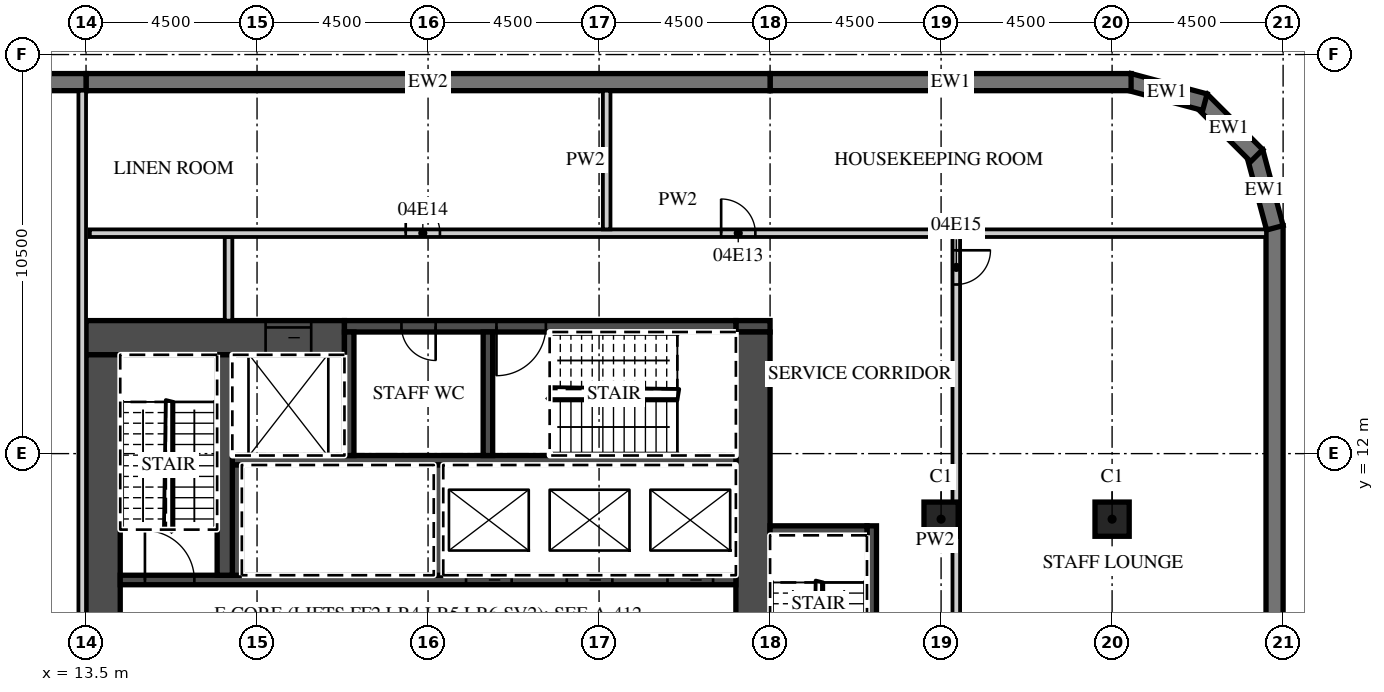
"""IFC4 building model, lengths in metres.
Left out: names, types, materials, properties, quantities, classifications, styles, units other than length and angle.
Written with IfcOpenShell. Run it as: python <this file> out.ifc"""

import sys

from ifc_helpers import new_model, si_unit, direction, frame, frame_2d, origin, origin_2d, place, context, subcontext, project, spatial, polyline, rectangle, outline, extrude, element, fill, save


model = new_model("IFC4")
c1 = context("Model", 3, precision=1e-05, world=origin(), true_north=direction((0.0, 1.0)))
c2 = subcontext(c1, "Body", "Model", "MODEL_VIEW")
j1 = project(units=[si_unit("LENGTHUNIT", "METRE"), si_unit("PLANEANGLEUNIT", "RADIAN")], contexts=[c1])
p1 = place(None, origin())
s1 = spatial("IfcSite", under=j1, at=p1, CompositionType="ELEMENT")
p2 = place(p1, origin())
s2 = spatial("IfcBuilding", under=s1, at=p2, CompositionType="ELEMENT")
p3 = place(p2, frame((0.0, 0.0, 29.0)))
s3 = spatial("IfcBuildingStorey", under=s2, at=p3, CompositionType="ELEMENT", Elevation=29.0)
for number, where, z_axis, x_axis in (
    (1, (36.0, 10.275, 0.0), (0.0, 0.0, 1.0), (1.0, 0.0, 0.0)),
    (2, (40.5, 10.275, 0.0), (0.0, 0.0, 1.0), (1.0, 0.0, 0.0)),
):
    element("IfcColumn", number, at=place(p3, frame(where, z_axis=z_axis, x_axis=x_axis)), inside=s3, PredefinedType="COLUMN", context=c2, shape_type="SweptSolid", body=[
        extrude(rectangle(XDim=0.9, YDim=0.9, at=origin_2d()), origin(), (0.0, 0.0, 1.0), 4.5),
    ])
p4 = place(p3, frame((44.775, -18.0, 0.0), z_axis=(0.0, 0.0, 1.0), x_axis=(0.0, 1.0, 0.0)))
e3 = element("IfcWall", 3, at=p4, inside=s3, PredefinedType="SOLIDWALL", context=c2, shape_type="SweptSolid", body=[
    extrude(rectangle(XDim=36.0, YDim=0.45, at=frame_2d((18.0, 0.0))), origin(), (0.0, 0.0, 1.0), 4.05),
])
p5 = place(p4, frame((4.05, 0.0, 0.9)))
e4 = element("IfcOpeningElement", 4, at=p5, cuts=e3, PredefinedType="OPENING", context=c2, shape_type="SweptSolid", body=[
    extrude(rectangle(XDim=3.0, YDim=1.8, at=frame_2d((1.5, 0.9))), frame((0.0, 0.235, 0.0), z_axis=(0.0, -1.0, 0.0), x_axis=(1.0, 0.0, 0.0)), (0.0, 0.0, 1.0), 0.47),
])
p6 = place(p3, frame((44.783, 17.942, 0.0), z_axis=(0.0, 0.0, 1.0), x_axis=(-0.25881466832, 0.965926999034, 0.0)))
e5 = element("IfcWall", 5, at=p6, inside=s3, PredefinedType="SOLIDWALL", context=c2, shape_type="SweptSolid", body=[
    extrude(outline(polyline([(0.0, -0.225), (2.071, -0.225), (1.95, 0.225), (0.121, 0.225), (0.0, -0.225)])), origin(), (0.0, 0.0, 1.0), 4.05),
])
p7 = place(p3, frame((44.305, 19.841, 0.0), z_axis=(0.0, 0.0, 1.0), x_axis=(-0.707106781187, 0.707106781187, 0.0)))
e6 = element("IfcWall", 6, at=p7, inside=s3, PredefinedType="SOLIDWALL", context=c2, shape_type="SweptSolid", body=[
    extrude(outline(polyline([(0.0, -0.225), (2.071, -0.225), (1.95, 0.225), (0.121, 0.225), (0.0, -0.225)])), origin(), (0.0, 0.0, 1.0), 4.05),
])
p8 = place(p3, frame((42.942, 21.247, 0.0), z_axis=(0.0, 0.0, 1.0), x_axis=(-0.965926999034, 0.25881466832, 0.0)))
e7 = element("IfcWall", 7, at=p8, inside=s3, PredefinedType="SOLIDWALL", context=c2, shape_type="SweptSolid", body=[
    extrude(outline(polyline([(-0.0, -0.225), (2.07, -0.225), (1.95, 0.225), (0.12, 0.225), (-0.0, -0.225)])), origin(), (0.0, 0.0, 1.0), 4.05),
])
p9 = place(p3, frame((41.0, 21.775, 0.0), z_axis=(0.0, 0.0, 1.0), x_axis=(-1.0, 0.0, 0.0)))
e8 = element("IfcWall", 8, at=p9, inside=s3, PredefinedType="SOLIDWALL", context=c2, shape_type="SweptSolid", body=[
    extrude(rectangle(XDim=9.5, YDim=0.45, at=frame_2d((4.75, 0.0))), origin(), (0.0, 0.0, 1.0), 4.05),
])
p10 = place(p3, frame((31.5, 21.775, 0.0), z_axis=(0.0, 0.0, 1.0), x_axis=(-1.0, 0.0, 0.0)))
e9 = element("IfcWall", 9, at=p10, inside=s3, PredefinedType="SOLIDWALL", context=c2, shape_type="SweptSolid", body=[
    extrude(rectangle(XDim=18.0, YDim=0.45, at=frame_2d((9.0, 0.0))), origin(), (0.0, 0.0, 1.0), 4.05),
])
p11 = place(p3, frame((13.5, 21.775, 0.0), z_axis=(0.0, 0.0, 1.0), x_axis=(-1.0, 0.0, 0.0)))
e10 = element("IfcWall", 10, at=p11, inside=s3, PredefinedType="SOLIDWALL", context=c2, shape_type="SweptSolid", body=[
    extrude(rectangle(XDim=54.5, YDim=0.45, at=frame_2d((27.25, 0.0))), origin(), (0.0, 0.0, 1.0), 4.05),
])
p12 = place(p11, frame((1.05, 0.0, 0.9)))
e11 = element("IfcOpeningElement", 11, at=p12, cuts=e10, PredefinedType="OPENING", context=c2, shape_type="SweptSolid", body=[
    extrude(rectangle(XDim=2.4, YDim=1.8, at=frame_2d((1.2, 0.9))), frame((0.0, 0.235, 0.0), z_axis=(0.0, -1.0, 0.0), x_axis=(1.0, 0.0, 0.0)), (0.0, 0.0, 1.0), 0.47),
])
p13 = place(p11, frame((5.55, 0.0, 0.9)))
e12 = element("IfcOpeningElement", 12, at=p13, cuts=e10, PredefinedType="OPENING", context=c2, shape_type="SweptSolid", body=[
    extrude(rectangle(XDim=2.4, YDim=1.8, at=frame_2d((1.2, 0.9))), frame((0.0, 0.235, 0.0), z_axis=(0.0, -1.0, 0.0), x_axis=(1.0, 0.0, 0.0)), (0.0, 0.0, 1.0), 0.47),
])
p14 = place(p11, frame((10.05, 0.0, 0.9)))
e13 = element("IfcOpeningElement", 13, at=p14, cuts=e10, PredefinedType="OPENING", context=c2, shape_type="SweptSolid", body=[
    extrude(rectangle(XDim=2.4, YDim=1.8, at=frame_2d((1.2, 0.9))), frame((0.0, 0.235, 0.0), z_axis=(0.0, -1.0, 0.0), x_axis=(1.0, 0.0, 0.0)), (0.0, 0.0, 1.0), 0.47),
])
p15 = place(p11, frame((14.55, 0.0, 0.9)))
e14 = element("IfcOpeningElement", 14, at=p15, cuts=e10, PredefinedType="OPENING", context=c2, shape_type="SweptSolid", body=[
    extrude(rectangle(XDim=2.4, YDim=1.8, at=frame_2d((1.2, 0.9))), frame((0.0, 0.235, 0.0), z_axis=(0.0, -1.0, 0.0), x_axis=(1.0, 0.0, 0.0)), (0.0, 0.0, 1.0), 0.47),
])
p16 = place(p11, frame((19.05, 0.0, 0.9)))
e15 = element("IfcOpeningElement", 15, at=p16, cuts=e10, PredefinedType="OPENING", context=c2, shape_type="SweptSolid", body=[
    extrude(rectangle(XDim=2.4, YDim=1.8, at=frame_2d((1.2, 0.9))), frame((0.0, 0.235, 0.0), z_axis=(0.0, -1.0, 0.0), x_axis=(1.0, 0.0, 0.0)), (0.0, 0.0, 1.0), 0.47),
])
p17 = place(p11, frame((23.55, 0.0, 0.9)))
e16 = element("IfcOpeningElement", 16, at=p17, cuts=e10, PredefinedType="OPENING", context=c2, shape_type="SweptSolid", body=[
    extrude(rectangle(XDim=2.4, YDim=1.8, at=frame_2d((1.2, 0.9))), frame((0.0, 0.235, 0.0), z_axis=(0.0, -1.0, 0.0), x_axis=(1.0, 0.0, 0.0)), (0.0, 0.0, 1.0), 0.47),
])
p18 = place(p11, frame((28.05, 0.0, 0.9)))
e17 = element("IfcOpeningElement", 17, at=p18, cuts=e10, PredefinedType="OPENING", context=c2, shape_type="SweptSolid", body=[
    extrude(rectangle(XDim=2.4, YDim=1.8, at=frame_2d((1.2, 0.9))), frame((0.0, 0.235, 0.0), z_axis=(0.0, -1.0, 0.0), x_axis=(1.0, 0.0, 0.0)), (0.0, 0.0, 1.0), 0.47),
])
p19 = place(p11, frame((32.55, 0.0, 0.9)))
e18 = element("IfcOpeningElement", 18, at=p19, cuts=e10, PredefinedType="OPENING", context=c2, shape_type="SweptSolid", body=[
    extrude(rectangle(XDim=2.4, YDim=1.8, at=frame_2d((1.2, 0.9))), frame((0.0, 0.235, 0.0), z_axis=(0.0, -1.0, 0.0), x_axis=(1.0, 0.0, 0.0)), (0.0, 0.0, 1.0), 0.47),
])
p20 = place(p11, frame((37.05, 0.0, 0.9)))
e19 = element("IfcOpeningElement", 19, at=p20, cuts=e10, PredefinedType="OPENING", context=c2, shape_type="SweptSolid", body=[
    extrude(rectangle(XDim=2.4, YDim=1.8, at=frame_2d((1.2, 0.9))), frame((0.0, 0.235, 0.0), z_axis=(0.0, -1.0, 0.0), x_axis=(1.0, 0.0, 0.0)), (0.0, 0.0, 1.0), 0.47),
])
p21 = place(p11, frame((41.55, 0.0, 0.9)))
e20 = element("IfcOpeningElement", 20, at=p21, cuts=e10, PredefinedType="OPENING", context=c2, shape_type="SweptSolid", body=[
    extrude(rectangle(XDim=2.4, YDim=1.8, at=frame_2d((1.2, 0.9))), frame((0.0, 0.235, 0.0), z_axis=(0.0, -1.0, 0.0), x_axis=(1.0, 0.0, 0.0)), (0.0, 0.0, 1.0), 0.47),
])
p22 = place(p11, frame((46.05, 0.0, 0.9)))
e21 = element("IfcOpeningElement", 21, at=p22, cuts=e10, PredefinedType="OPENING", context=c2, shape_type="SweptSolid", body=[
    extrude(rectangle(XDim=2.4, YDim=1.8, at=frame_2d((1.2, 0.9))), frame((0.0, 0.235, 0.0), z_axis=(0.0, -1.0, 0.0), x_axis=(1.0, 0.0, 0.0)), (0.0, 0.0, 1.0), 0.47),
])
p23 = place(p3, frame((13.5, 15.05, 0.0), z_axis=(0.0, 0.0, 1.0), x_axis=(1.0, 0.0, 0.0)))
e22 = element("IfcWall", 22, at=p23, inside=s3, PredefinedType="SHEAR", context=c2, shape_type="SweptSolid", body=[
    extrude(rectangle(XDim=6.8, YDim=0.9, at=frame_2d((3.4, 0.0))), origin(), (0.0, 0.0, 1.0), 4.05),
])
p24 = place(p23, frame((4.725, 0.0, 0.0)))
e23 = element("IfcOpeningElement", 23, at=p24, cuts=e22, PredefinedType="OPENING", context=c2, shape_type="SweptSolid", body=[
    extrude(rectangle(XDim=1.2, YDim=2.1, at=frame_2d((0.6, 1.05))), frame((0.0, 0.46, 0.0), z_axis=(0.0, -1.0, 0.0), x_axis=(1.0, 0.0, 0.0)), (0.0, 0.0, 1.0), 0.92),
])
p25 = place(p3, frame((30.6, 15.35, 0.0), z_axis=(0.0, 0.0, 1.0), x_axis=(1.0, 0.0, 0.0)))
e24 = element("IfcWall", 24, at=p25, inside=s3, PredefinedType="SHEAR", context=c2, shape_type="SweptSolid", body=[
    extrude(rectangle(XDim=0.9, YDim=0.3, at=frame_2d((0.45, 0.0))), origin(), (0.0, 0.0, 1.0), 4.05),
])
p26 = place(p3, frame((20.3, 15.35, 0.0), z_axis=(0.0, 0.0, 1.0), x_axis=(1.0, 0.0, 0.0)))
e25 = element("IfcWall", 25, at=p26, inside=s3, PredefinedType="SHEAR", context=c2, shape_type="SweptSolid", body=[
    extrude(rectangle(XDim=10.3, YDim=0.3, at=frame_2d((5.15, 0.0))), origin(), (0.0, 0.0, 1.0), 4.05),
])
p27 = place(p26, frame((4.0, 0.0, 0.0)))
e26 = element("IfcOpeningElement", 26, at=p27, cuts=e25, PredefinedType="OPENING", context=c2, shape_type="SweptSolid", body=[
    extrude(rectangle(XDim=1.3, YDim=2.1, at=frame_2d((0.65, 1.05))), frame((0.0, 0.16, 0.0), z_axis=(0.0, -1.0, 0.0), x_axis=(1.0, 0.0, 0.0)), (0.0, 0.0, 1.0), 0.32),
])
p28 = place(p26, frame((1.5, 0.0, 0.0)))
e27 = element("IfcOpeningElement", 27, at=p28, cuts=e25, PredefinedType="OPENING", context=c2, shape_type="SweptSolid", body=[
    extrude(rectangle(XDim=0.9, YDim=2.1, at=frame_2d((0.45, 1.05))), frame((0.0, 0.16, 0.0), z_axis=(0.0, -1.0, 0.0), x_axis=(1.0, 0.0, 0.0)), (0.0, 0.0, 1.0), 0.32),
])
p29 = place(p3, frame((31.05, 2.4, 0.0), z_axis=(0.0, 0.0, 1.0), x_axis=(0.0, 1.0, 0.0)))
e28 = element("IfcWall", 28, at=p29, inside=s3, PredefinedType="SHEAR", context=c2, shape_type="SweptSolid", body=[
    extrude(rectangle(XDim=12.8, YDim=0.9, at=frame_2d((6.4, 0.0))), origin(), (0.0, 0.0, 1.0), 4.05),
])
p30 = place(p29, frame((0.2, 0.0, 0.0)))
e29 = element("IfcOpeningElement", 29, at=p30, cuts=e28, PredefinedType="OPENING", context=c2, shape_type="SweptSolid", body=[
    extrude(rectangle(XDim=1.1, YDim=2.1, at=frame_2d((0.55, 1.05))), frame((0.0, 0.46, 0.0), z_axis=(0.0, -1.0, 0.0), x_axis=(1.0, 0.0, 0.0)), (0.0, 0.0, 1.0), 0.92),
])
p31 = place(p3, frame((13.95, 2.4, 0.0), z_axis=(0.0, 0.0, 1.0), x_axis=(0.0, 1.0, 0.0)))
e30 = element("IfcWall", 30, at=p31, inside=s3, PredefinedType="SHEAR", context=c2, shape_type="SweptSolid", body=[
    extrude(rectangle(XDim=12.2, YDim=0.9, at=frame_2d((6.1, 0.0))), origin(), (0.0, 0.0, 1.0), 4.05),
])
p32 = place(p3, frame((14.4, 8.675, 0.0), z_axis=(0.0, 0.0, 1.0), x_axis=(1.0, 0.0, 0.0)))
e31 = element("IfcWall", 31, at=p32, inside=s3, PredefinedType="SHEAR", context=c2, shape_type="SweptSolid", body=[
    extrude(rectangle(XDim=16.2, YDim=0.25, at=frame_2d((8.1, 0.0))), origin(), (0.0, 0.0, 1.0), 4.05),
])
p33 = place(p32, frame((14.4, 0.0, 0.0)))
e32 = element("IfcOpeningElement", 32, at=p33, cuts=e31, PredefinedType="OPENING", context=c2, shape_type="SweptSolid", body=[
    extrude(rectangle(XDim=1.2, YDim=2.1, at=frame_2d((0.6, 1.05))), frame((0.0, 0.135, 0.0), z_axis=(0.0, -1.0, 0.0), x_axis=(1.0, 0.0, 0.0)), (0.0, 0.0, 1.0), 0.27),
])
p34 = place(p32, frame((11.75, 0.0, 0.0)))
e33 = element("IfcOpeningElement", 33, at=p34, cuts=e31, PredefinedType="OPENING", context=c2, shape_type="SweptSolid", body=[
    extrude(rectangle(XDim=1.2, YDim=2.1, at=frame_2d((0.6, 1.05))), frame((0.0, 0.135, 0.0), z_axis=(0.0, -1.0, 0.0), x_axis=(1.0, 0.0, 0.0)), (0.0, 0.0, 1.0), 0.27),
])
p35 = place(p32, frame((9.1, 0.0, 0.0)))
e34 = element("IfcOpeningElement", 34, at=p35, cuts=e31, PredefinedType="OPENING", context=c2, shape_type="SweptSolid", body=[
    extrude(rectangle(XDim=1.2, YDim=2.1, at=frame_2d((0.6, 1.05))), frame((0.0, 0.135, 0.0), z_axis=(0.0, -1.0, 0.0), x_axis=(1.0, 0.0, 0.0)), (0.0, 0.0, 1.0), 0.27),
])
p36 = place(p32, frame((0.65, 0.0, 0.0)))
e35 = element("IfcOpeningElement", 35, at=p36, cuts=e31, PredefinedType="OPENING", context=c2, shape_type="SweptSolid", body=[
    extrude(rectangle(XDim=1.3, YDim=2.1, at=frame_2d((0.65, 1.05))), frame((0.0, 0.135, 0.0), z_axis=(0.0, -1.0, 0.0), x_axis=(1.0, 0.0, 0.0)), (0.0, 0.0, 1.0), 0.27),
])
p37 = place(p3, frame((17.35, 11.825, 0.0), z_axis=(0.0, 0.0, 1.0), x_axis=(1.0, 0.0, 0.0)))
e36 = element("IfcWall", 36, at=p37, inside=s3, PredefinedType="SHEAR", context=c2, shape_type="SweptSolid", body=[
    extrude(rectangle(XDim=13.25, YDim=0.25, at=frame_2d((6.625, 0.0))), origin(), (0.0, 0.0, 1.0), 4.05),
])
for number, where, z_axis, x_axis in (
    (37, (17.475, 8.8, 0.0), (0.0, 0.0, 1.0), (0.0, 1.0, 0.0)),
    (38, (22.775, 8.8, 0.0), (0.0, 0.0, 1.0), (0.0, 1.0, 0.0)),
):
    element("IfcWall", number, at=place(p3, frame(where, z_axis=z_axis, x_axis=x_axis)), inside=s3, PredefinedType="SHEAR", context=c2, shape_type="SweptSolid", body=[
        extrude(rectangle(XDim=2.9, YDim=0.25, at=frame_2d((1.45, 0.0))), origin(), (0.0, 0.0, 1.0), 4.05),
    ])
p38 = place(p3, frame((17.15, 8.8, 0.0), z_axis=(0.0, 0.0, 1.0), x_axis=(0.0, 1.0, 0.0)))
e39 = element("IfcWall", 39, at=p38, inside=s3, PredefinedType="SHEAR", context=c2, shape_type="SweptSolid", body=[
    extrude(rectangle(XDim=5.8, YDim=0.4, at=frame_2d((2.9, 0.0))), origin(), (0.0, 0.0, 1.0), 4.05),
])
for number, where, z_axis, x_axis in (
    (40, (20.425, 11.95, 0.0), (0.0, 0.0, 1.0), (0.0, 1.0, 0.0)),
    (41, (24.075, 11.95, 0.0), (0.0, 0.0, 1.0), (0.0, 1.0, 0.0)),
):
    element("IfcWall", number, at=place(p3, frame(where, z_axis=z_axis, x_axis=x_axis)), inside=s3, PredefinedType="SHEAR", context=c2, shape_type="SweptSolid", body=[
        extrude(rectangle(XDim=3.25, YDim=0.25, at=frame_2d((1.625, 0.0))), origin(), (0.0, 0.0, 1.0), 4.05),
    ])
p39 = place(p3, frame((34.175, 1.75, 0.0), z_axis=(0.0, 0.0, 1.0), x_axis=(0.0, 1.0, 0.0)))
e42 = element("IfcWall", 42, at=p39, inside=s3, PredefinedType="SHEAR", context=c2, shape_type="SweptSolid", body=[
    extrude(rectangle(XDim=8.35, YDim=0.25, at=frame_2d((4.175, 0.0))), origin(), (0.0, 0.0, 1.0), 4.05),
])
p40 = place(p3, frame((31.5, 9.975, 0.0), z_axis=(0.0, 0.0, 1.0), x_axis=(1.0, 0.0, 0.0)))
e43 = element("IfcWall", 43, at=p40, inside=s3, PredefinedType="SHEAR", context=c2, shape_type="SweptSolid", body=[
    extrude(rectangle(XDim=2.55, YDim=0.25, at=frame_2d((1.275, 0.0))), origin(), (0.0, 0.0, 1.0), 4.05),
])
p41 = place(p3, frame((17.25, 15.5, 0.0), z_axis=(0.0, 0.0, 1.0), x_axis=(0.0, 1.0, 0.0)))
e44 = element("IfcWall", 44, at=p41, inside=s3, PredefinedType="PARTITIONING", context=c2, shape_type="SweptSolid", body=[
    extrude(rectangle(XDim=2.2, YDim=0.2, at=frame_2d((1.1, 0.0))), origin(), (0.0, 0.0, 1.0), 4.05),
])
p42 = place(p3, frame((36.4, 1.75, 0.0), z_axis=(0.0, 0.0, 1.0), x_axis=(0.0, 1.0, 0.0)))
e45 = element("IfcWall", 45, at=p42, inside=s3, PredefinedType="PARTITIONING", context=c2, shape_type="SweptSolid", body=[
    extrude(rectangle(XDim=15.95, YDim=0.2, at=frame_2d((7.975, 0.0))), origin(), (0.0, 0.0, 1.0), 4.05),
])
p43 = place(p42, frame((14.7, 0.0, 0.0)))
e46 = element("IfcOpeningElement", 46, at=p43, cuts=e45, PredefinedType="OPENING", context=c2, shape_type="SweptSolid", body=[
    extrude(rectangle(XDim=0.9, YDim=2.1, at=frame_2d((0.45, 1.05))), frame((0.0, 0.11, 0.0), z_axis=(0.0, -1.0, 0.0), x_axis=(1.0, 0.0, 0.0)), (0.0, 0.0, 1.0), 0.22),
])
p44 = place(p3, frame((13.6, 17.8, 0.0), z_axis=(0.0, 0.0, 1.0), x_axis=(1.0, 0.0, 0.0)))
e47 = element("IfcWall", 47, at=p44, inside=s3, PredefinedType="PARTITIONING", context=c2, shape_type="SweptSolid", body=[
    extrude(rectangle(XDim=30.95, YDim=0.2, at=frame_2d((15.475, 0.0))), origin(), (0.0, 0.0, 1.0), 4.05),
])
p45 = place(p44, frame((16.613, 0.0, 0.0)))
e48 = element("IfcOpeningElement", 48, at=p45, cuts=e47, PredefinedType="OPENING", context=c2, shape_type="SweptSolid", body=[
    extrude(rectangle(XDim=0.9, YDim=2.1, at=frame_2d((0.45, 1.05))), frame((0.0, 0.11, 0.0), z_axis=(0.0, -1.0, 0.0), x_axis=(1.0, 0.0, 0.0)), (0.0, 0.0, 1.0), 0.22),
])
p46 = place(p44, frame((8.312, 0.0, 0.0)))
e49 = element("IfcOpeningElement", 49, at=p46, cuts=e47, PredefinedType="OPENING", context=c2, shape_type="SweptSolid", body=[
    extrude(rectangle(XDim=0.9, YDim=2.1, at=frame_2d((0.45, 1.05))), frame((0.0, 0.11, 0.0), z_axis=(0.0, -1.0, 0.0), x_axis=(1.0, 0.0, 0.0)), (0.0, 0.0, 1.0), 0.22),
])
p47 = place(p3, frame((27.2, 17.9, 0.0), z_axis=(0.0, 0.0, 1.0), x_axis=(0.0, 1.0, 0.0)))
e50 = element("IfcWall", 50, at=p47, inside=s3, PredefinedType="PARTITIONING", context=c2, shape_type="SweptSolid", body=[
    extrude(rectangle(XDim=3.65, YDim=0.2, at=frame_2d((1.825, 0.0))), origin(), (0.0, 0.0, 1.0), 4.05),
])
p48 = place(p3, frame((13.4, 1.7, 0.0), z_axis=(0.0, 0.0, 1.0), x_axis=(0.0, 1.0, 0.0)))
e51 = element("IfcWall", 51, at=p48, inside=s3, PredefinedType="PARTITIONING", context=c2, shape_type="SweptSolid", body=[
    extrude(rectangle(XDim=19.85, YDim=0.2, at=frame_2d((9.925, 0.0))), origin(), (0.0, 0.0, 1.0), 4.05),
])
p49 = place(p33, origin())
e52 = element("IfcDoor", 52, at=p49, inside=s3, OperationType="SLIDING_TO_LEFT", PredefinedType="DOOR", context=c2, shape_type="SweptSolid", body=[
    extrude(rectangle(XDim=1.2, YDim=2.1, at=frame_2d((0.6, 1.05))), frame((0.0, 0.025, 0.0), z_axis=(0.0, -1.0, 0.0), x_axis=(1.0, 0.0, 0.0)), (0.0, 0.0, 1.0), 0.05),
])
fill(e32, e52)
p50 = place(p34, origin())
e53 = element("IfcDoor", 53, at=p50, inside=s3, OperationType="SLIDING_TO_RIGHT", PredefinedType="DOOR", context=c2, shape_type="SweptSolid", body=[
    extrude(rectangle(XDim=1.2, YDim=2.1, at=frame_2d((0.6, 1.05))), frame((0.0, 0.025, 0.0), z_axis=(0.0, -1.0, 0.0), x_axis=(1.0, 0.0, 0.0)), (0.0, 0.0, 1.0), 0.05),
])
fill(e33, e53)
p51 = place(p35, origin())
e54 = element("IfcDoor", 54, at=p51, inside=s3, OperationType="SLIDING_TO_RIGHT", PredefinedType="DOOR", context=c2, shape_type="SweptSolid", body=[
    extrude(rectangle(XDim=1.2, YDim=2.1, at=frame_2d((0.6, 1.05))), frame((0.0, 0.025, 0.0), z_axis=(0.0, -1.0, 0.0), x_axis=(1.0, 0.0, 0.0)), (0.0, 0.0, 1.0), 0.05),
])
fill(e34, e54)
p52 = place(p24, origin())
e55 = element("IfcDoor", 55, at=p52, inside=s3, OperationType="SLIDING_TO_LEFT", PredefinedType="DOOR", context=c2, shape_type="SweptSolid", body=[
    extrude(rectangle(XDim=1.2, YDim=2.1, at=frame_2d((0.6, 1.05))), frame((0.0, 0.025, 0.0), z_axis=(0.0, -1.0, 0.0), x_axis=(1.0, 0.0, 0.0)), (0.0, 0.0, 1.0), 0.05),
])
fill(e23, e55)
p53 = place(p36, origin())
e56 = element("IfcDoor", 56, at=p53, inside=s3, OperationType="SINGLE_SWING_LEFT", PredefinedType="DOOR", context=c2, shape_type="SweptSolid", body=[
    extrude(rectangle(XDim=1.3, YDim=2.1, at=frame_2d((0.65, 1.05))), frame((0.0, 0.025, 0.0), z_axis=(0.0, -1.0, 0.0), x_axis=(1.0, 0.0, 0.0)), (0.0, 0.0, 1.0), 0.05),
])
fill(e35, e56)
p54 = place(p27, origin())
e57 = element("IfcDoor", 57, at=p54, inside=s3, OperationType="SINGLE_SWING_LEFT", PredefinedType="DOOR", context=c2, shape_type="SweptSolid", body=[
    extrude(rectangle(XDim=1.3, YDim=2.1, at=frame_2d((0.65, 1.05))), frame((0.0, 0.025, 0.0), z_axis=(0.0, -1.0, 0.0), x_axis=(1.0, 0.0, 0.0)), (0.0, 0.0, 1.0), 0.05),
])
fill(e26, e57)
p55 = place(p28, origin())
e58 = element("IfcDoor", 58, at=p55, inside=s3, OperationType="SINGLE_SWING_RIGHT", PredefinedType="DOOR", context=c2, shape_type="SweptSolid", body=[
    extrude(rectangle(XDim=0.9, YDim=2.1, at=frame_2d((0.45, 1.05))), frame((0.0, 0.025, 0.0), z_axis=(0.0, -1.0, 0.0), x_axis=(1.0, 0.0, 0.0)), (0.0, 0.0, 1.0), 0.05),
])
fill(e27, e58)
p56 = place(p45, origin())
e59 = element("IfcDoor", 59, at=p56, inside=s3, OperationType="SINGLE_SWING_LEFT", PredefinedType="DOOR", context=c2, shape_type="SweptSolid", body=[
    extrude(rectangle(XDim=0.9, YDim=2.1, at=frame_2d((0.45, 1.05))), frame((0.0, 0.025, 0.0), z_axis=(0.0, -1.0, 0.0), x_axis=(1.0, 0.0, 0.0)), (0.0, 0.0, 1.0), 0.05),
])
fill(e48, e59)
p57 = place(p46, origin())
e60 = element("IfcDoor", 60, at=p57, inside=s3, OperationType="SINGLE_SWING_LEFT", PredefinedType="DOOR", context=c2, shape_type="SweptSolid", body=[
    extrude(rectangle(XDim=0.9, YDim=2.1, at=frame_2d((0.45, 1.05))), frame((0.0, 0.025, 0.0), z_axis=(0.0, -1.0, 0.0), x_axis=(1.0, 0.0, 0.0)), (0.0, 0.0, 1.0), 0.05),
])
fill(e49, e60)
p58 = place(p43, origin())
e61 = element("IfcDoor", 61, at=p58, inside=s3, OperationType="SINGLE_SWING_RIGHT", PredefinedType="DOOR", context=c2, shape_type="SweptSolid", body=[
    extrude(rectangle(XDim=0.9, YDim=2.1, at=frame_2d((0.45, 1.05))), frame((0.0, 0.025, 0.0), z_axis=(0.0, -1.0, 0.0), x_axis=(1.0, 0.0, 0.0)), (0.0, 0.0, 1.0), 0.05),
])
fill(e46, e61)
save(model, sys.argv[1])
